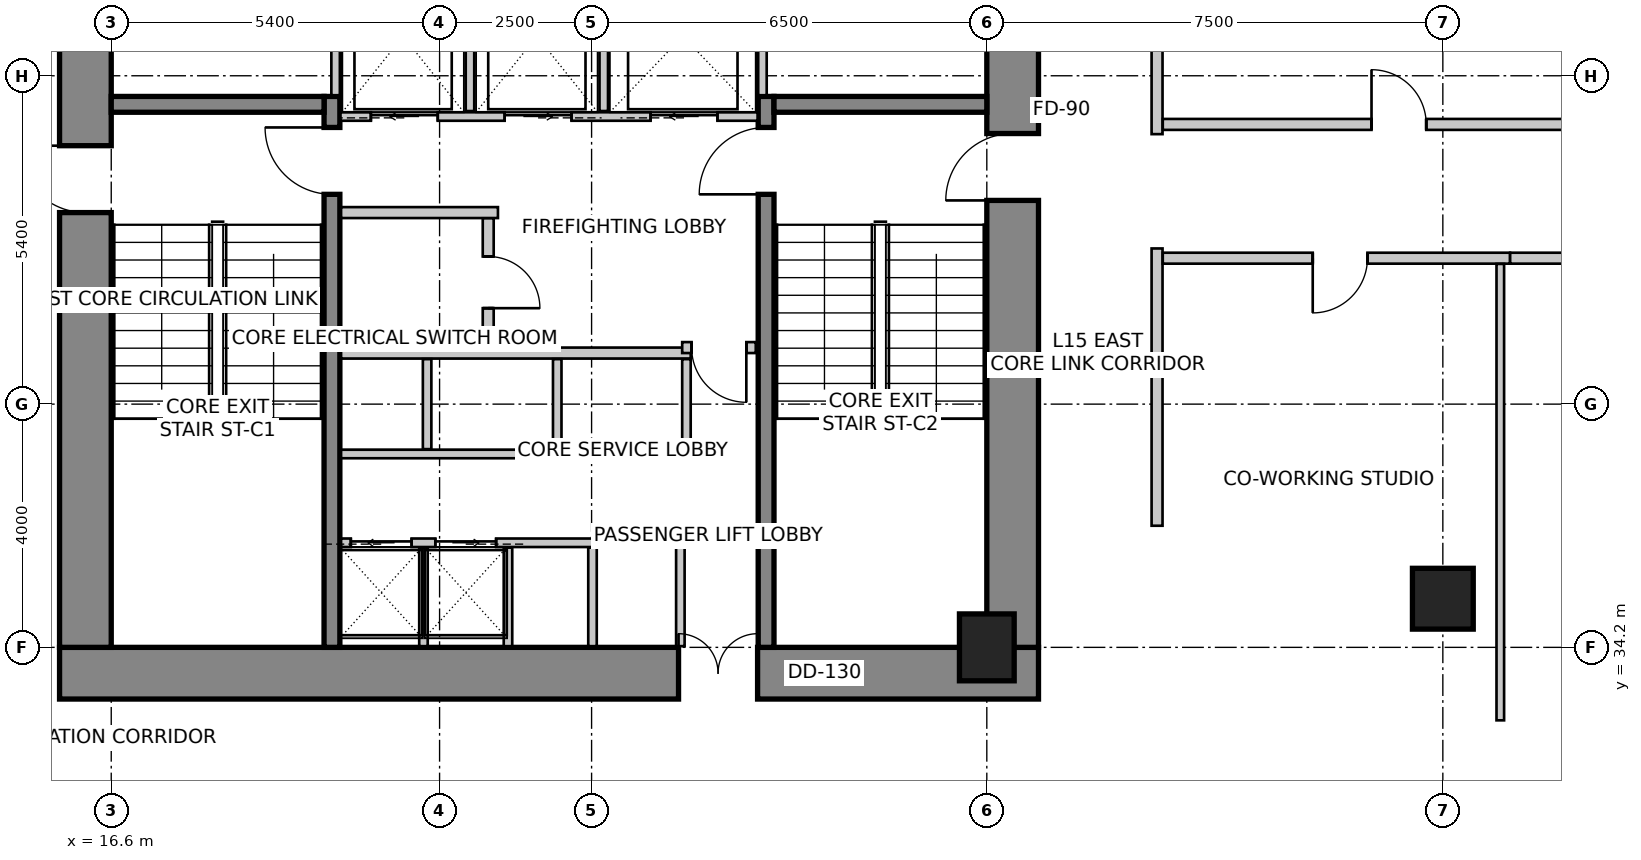
"""IFC4 building model, lengths in metres.
Left out: names, types, materials, properties, quantities, classifications, styles, units other than length and angle.
Written with IfcOpenShell. Run it as: python <this file> out.ifc"""

import sys

from ifc_helpers import new_model, si_unit, direction, frame, frame_2d, origin, origin_2d, place, context, subcontext, project, spatial, rectangle, extrude, source, transform, mapped, element, fill, save


model = new_model("IFC4")
c1 = context("Model", 3, precision=1e-05, world=origin(), true_north=direction((0.0, 1.0)))
c2 = subcontext(c1, "Body", "Model", "MODEL_VIEW")
j1 = project(units=[si_unit("LENGTHUNIT", "METRE"), si_unit("PLANEANGLEUNIT", "RADIAN")], contexts=[c1])
p1 = place(None, origin())
s1 = spatial("IfcSite", under=j1, at=p1, CompositionType="ELEMENT")
p2 = place(p1, origin())
s2 = spatial("IfcBuilding", under=s1, at=p2, CompositionType="ELEMENT")
p3 = place(p2, frame((0.0, 0.0, 63.0)))
s3 = spatial("IfcBuildingStorey", under=s2, at=p3, CompositionType="ELEMENT", Elevation=63.0)
p4 = place(p3, frame((15.75, 33.775, 0.0), z_axis=(0.0, 0.0, 1.0), x_axis=(1.0, 0.0, 0.0)))
e1 = element("IfcWall", 1, at=p4, inside=s3, PredefinedType="SHEAR", context=c2, shape_type="SweptSolid", body=[
    extrude(rectangle(XDim=16.1, YDim=0.85, at=frame_2d((8.05, 0.0))), origin(), (0.0, 0.0, 1.0), 4.0),
])
m1 = source(origin(), c2, "Body", "SweptSolid", [
    extrude(rectangle(XDim=1.3, YDim=2.15, at=frame_2d((0.65, 1.075))), frame((0.0, 0.435, 0.0), z_axis=(0.0, -1.0, 0.0), x_axis=(1.0, 0.0, 0.0)), (0.0, 0.0, 1.0), 0.87),
])
p5 = place(p4, frame((10.18, 0.0, 0.0)))
e2 = element("IfcOpeningElement", 2, at=p5, cuts=e1, PredefinedType="OPENING", context=c2, shape_type="MappedRepresentation", body=[
    mapped(m1, transform((0.0, 0.0, 0.0), scale=1.0)),
])
p6 = place(p3, frame((16.175, 34.2, 0.0), z_axis=(0.0, 0.0, 1.0), x_axis=(0.0, 1.0, 0.0)))
e3 = element("IfcWall", 3, at=p6, inside=s3, PredefinedType="SHEAR", context=c2, shape_type="SweptSolid", body=[
    extrude(rectangle(XDim=11.4, YDim=0.85, at=frame_2d((5.7, 0.0))), origin(), (0.0, 0.0, 1.0), 4.0),
])
m2 = source(origin(), c2, "Body", "SweptSolid", [
    extrude(rectangle(XDim=1.1, YDim=2.15, at=frame_2d((0.55, 1.075))), frame((0.0, 0.435, 0.0), z_axis=(0.0, -1.0, 0.0), x_axis=(1.0, 0.0, 0.0)), (0.0, 0.0, 1.0), 0.87),
])
p7 = place(p6, frame((7.15, 0.0, 0.0)))
e4 = element("IfcOpeningElement", 4, at=p7, cuts=e3, PredefinedType="OPENING", context=c2, shape_type="MappedRepresentation", body=[
    mapped(m2, transform((0.0, 0.0, 0.0), scale=1.0)),
])
p8 = place(p3, frame((31.425, 34.2, 0.0), z_axis=(0.0, 0.0, 1.0), x_axis=(0.0, 1.0, 0.0)))
e5 = element("IfcWall", 5, at=p8, inside=s3, PredefinedType="SHEAR", context=c2, shape_type="SweptSolid", body=[
    extrude(rectangle(XDim=11.4, YDim=0.85, at=frame_2d((5.7, 0.0))), origin(), (0.0, 0.0, 1.0), 4.0),
])
p9 = place(p8, frame((7.35, 0.0, 0.0)))
e6 = element("IfcOpeningElement", 6, at=p9, cuts=e5, PredefinedType="OPENING", context=c2, shape_type="MappedRepresentation", body=[
    mapped(m2, transform((0.0, 0.0, 0.0), scale=1.0)),
])
p10 = place(p3, frame((20.23, 34.2, 0.0), z_axis=(0.0, 0.0, 1.0), x_axis=(0.0, 1.0, 0.0)))
e7 = element("IfcWall", 7, at=p10, inside=s3, PredefinedType="SHEAR", context=c2, shape_type="SweptSolid", body=[
    extrude(rectangle(XDim=9.06, YDim=0.26, at=frame_2d((4.53, 0.0))), origin(), (0.0, 0.0, 1.0), 4.0),
])
m3 = source(origin(), c2, "Body", "SweptSolid", [
    extrude(rectangle(XDim=1.1, YDim=2.15, at=frame_2d((0.55, 1.075))), frame((0.0, 0.14, 0.0), z_axis=(0.0, -1.0, 0.0), x_axis=(1.0, 0.0, 0.0)), (0.0, 0.0, 1.0), 0.28),
])
p11 = place(p10, frame((7.45, 0.0, 0.0)))
e8 = element("IfcOpeningElement", 8, at=p11, cuts=e7, PredefinedType="OPENING", context=c2, shape_type="MappedRepresentation", body=[
    mapped(m3, transform((0.0, 0.0, 0.0), scale=1.0)),
])
p12 = place(p3, frame((27.37, 34.2, 0.0), z_axis=(0.0, 0.0, 1.0), x_axis=(0.0, 1.0, 0.0)))
e9 = element("IfcWall", 9, at=p12, inside=s3, PredefinedType="SHEAR", context=c2, shape_type="SweptSolid", body=[
    extrude(rectangle(XDim=9.06, YDim=0.26, at=frame_2d((4.53, 0.0))), origin(), (0.0, 0.0, 1.0), 4.0),
])
p13 = place(p12, frame((7.45, 0.0, 0.0)))
e10 = element("IfcOpeningElement", 10, at=p13, cuts=e9, PredefinedType="OPENING", context=c2, shape_type="MappedRepresentation", body=[
    mapped(m3, transform((0.0, 0.0, 0.0), scale=1.0)),
])
for number, where, z_axis, x_axis in (
    (11, (16.6, 43.13, 0.0), (0.0, 0.0, 1.0), (1.0, 0.0, 0.0)),
    (12, (27.5, 43.13, 0.0), (0.0, 0.0, 1.0), (1.0, 0.0, 0.0)),
):
    element("IfcWall", number, at=place(p3, frame(where, z_axis=z_axis, x_axis=x_axis)), inside=s3, PredefinedType="SHEAR", context=c2, shape_type="SweptSolid", body=[
        extrude(rectangle(XDim=3.5, YDim=0.26, at=frame_2d((1.75, 0.0))), origin(), (0.0, 0.0, 1.0), 4.0),
    ])
m4 = source(origin(), c2, "Body", "SweptSolid", [
    extrude(rectangle(XDim=0.9, YDim=1.1, at=origin_2d()), origin(), (0.0, 0.0, 1.0), 4.0),
])
p14 = place(p3, frame((31.0, 34.2, 0.0), z_axis=(0.0, 0.0, 1.0), x_axis=(1.0, 0.0, 0.0)))
e13 = element("IfcColumn", 13, at=p14, inside=s3, PredefinedType="COLUMN", context=c2, shape_type="MappedRepresentation", body=[
    mapped(m4, transform((0.0, 0.0, 0.0), scale=1.0)),
])
m5 = source(origin(), c2, "Body", "SweptSolid", [
    extrude(rectangle(XDim=1.0, YDim=1.0, at=origin_2d()), origin(), (0.0, 0.0, 1.0), 4.0),
])
p15 = place(p3, frame((38.5, 35.0, 0.0), z_axis=(0.0, 0.0, 1.0), x_axis=(1.0, 0.0, 0.0)))
e14 = element("IfcColumn", 14, at=p15, inside=s3, PredefinedType="COLUMN", context=c2, shape_type="MappedRepresentation", body=[
    mapped(m5, transform((0.0, 0.0, 0.0), scale=1.0)),
])
p16 = place(p3, frame((20.37, 42.93, 0.0), z_axis=(0.0, 0.0, 1.0), x_axis=(1.0, 0.0, 0.0)))
e15 = element("IfcWall", 15, at=p16, inside=s3, PredefinedType="SOLIDWALL", context=c2, shape_type="SweptSolid", body=[
    extrude(rectangle(XDim=6.86, YDim=0.14, at=frame_2d((3.43, 0.0))), origin(), (0.0, 0.0, 1.0), 3.75),
])
m6 = source(origin(), c2, "Body", "SweptSolid", [
    extrude(rectangle(XDim=1.1, YDim=2.15, at=frame_2d((0.55, 1.075))), frame((0.0, 0.08, 0.0), z_axis=(0.0, -1.0, 0.0), x_axis=(1.0, 0.0, 0.0)), (0.0, 0.0, 1.0), 0.16),
])
p17 = place(p16, frame((0.5, 0.0, 0.0)))
e16 = element("IfcOpeningElement", 16, at=p17, cuts=e15, PredefinedType="OPENING", context=c2, shape_type="MappedRepresentation", body=[
    mapped(m6, transform((0.0, 0.0, 0.0), scale=1.0)),
])
p18 = place(p16, frame((2.7, 0.0, 0.0)))
e17 = element("IfcOpeningElement", 17, at=p18, cuts=e15, PredefinedType="OPENING", context=c2, shape_type="MappedRepresentation", body=[
    mapped(m6, transform((0.0, 0.0, 0.0), scale=1.0)),
])
p19 = place(p16, frame((5.1, 0.0, 0.0)))
e18 = element("IfcOpeningElement", 18, at=p19, cuts=e15, PredefinedType="OPENING", context=c2, shape_type="MappedRepresentation", body=[
    mapped(m6, transform((0.0, 0.0, 0.0), scale=1.0)),
])
for number, where, z_axis, x_axis in (
    (19, (20.29, 43.28, 0.0), (0.0, 0.0, 1.0), (0.0, 1.0, 0.0)),
    (20, (27.31, 43.28, 0.0), (0.0, 0.0, 1.0), (0.0, 1.0, 0.0)),
):
    element("IfcWall", number, at=place(p3, frame(where, z_axis=z_axis, x_axis=x_axis)), inside=s3, PredefinedType="SOLIDWALL", context=c2, shape_type="SweptSolid", body=[
        extrude(rectangle(XDim=2.3, YDim=0.14, at=frame_2d((1.15, 0.0))), origin(), (0.0, 0.0, 1.0), 3.75),
    ])
for number, where, z_axis, x_axis in (
    (21, (22.5, 43.02, 0.0), (0.0, 0.0, 1.0), (0.0, 1.0, 0.0)),
    (22, (24.7, 43.02, 0.0), (0.0, 0.0, 1.0), (0.0, 1.0, 0.0)),
):
    element("IfcWall", number, at=place(p3, frame(where, z_axis=z_axis, x_axis=x_axis)), inside=s3, PredefinedType="SOLIDWALL", context=c2, shape_type="SweptSolid", body=[
        extrude(rectangle(XDim=2.56, YDim=0.14, at=frame_2d((1.28, 0.0))), origin(), (0.0, 0.0, 1.0), 3.75),
    ])
p20 = place(p3, frame((20.38, 35.92, 0.0), z_axis=(0.0, 0.0, 1.0), x_axis=(1.0, 0.0, 0.0)))
e23 = element("IfcWall", 23, at=p20, inside=s3, PredefinedType="SOLIDWALL", context=c2, shape_type="SweptSolid", body=[
    extrude(rectangle(XDim=5.65, YDim=0.14, at=frame_2d((2.825, 0.0))), origin(), (0.0, 0.0, 1.0), 3.75),
])
m7 = source(origin(), c2, "Body", "SweptSolid", [
    extrude(rectangle(XDim=1.0, YDim=2.15, at=frame_2d((0.5, 1.075))), frame((0.0, 0.08, 0.0), z_axis=(0.0, -1.0, 0.0), x_axis=(1.0, 0.0, 0.0)), (0.0, 0.0, 1.0), 0.16),
])
p21 = place(p20, frame((0.16, 0.0, 0.0)))
e24 = element("IfcOpeningElement", 24, at=p21, cuts=e23, PredefinedType="OPENING", context=c2, shape_type="MappedRepresentation", body=[
    mapped(m7, transform((0.0, 0.0, 0.0), scale=1.0)),
])
p22 = place(p20, frame((1.55, 0.0, 0.0)))
e25 = element("IfcOpeningElement", 25, at=p22, cuts=e23, PredefinedType="OPENING", context=c2, shape_type="MappedRepresentation", body=[
    mapped(m7, transform((0.0, 0.0, 0.0), scale=1.0)),
])
for number, where, z_axis, x_axis in (
    (26, (25.96, 34.22, 0.0), (0.0, 0.0, 1.0), (0.0, 1.0, 0.0)),
    (27, (21.735, 34.22, 0.0), (0.0, 0.0, 1.0), (0.0, 1.0, 0.0)),
    (28, (23.125, 34.22, 0.0), (0.0, 0.0, 1.0), (0.0, 1.0, 0.0)),
    (29, (24.515, 34.22, 0.0), (0.0, 0.0, 1.0), (0.0, 1.0, 0.0)),
):
    element("IfcWall", number, at=place(p3, frame(where, z_axis=z_axis, x_axis=x_axis)), inside=s3, PredefinedType="SOLIDWALL", context=c2, shape_type="SweptSolid", body=[
        extrude(rectangle(XDim=1.62, YDim=0.14, at=frame_2d((0.81, 0.0))), origin(), (0.0, 0.0, 1.0), 3.042),
    ])
p23 = place(p3, frame((20.38, 37.38, 0.0), z_axis=(0.0, 0.0, 1.0), x_axis=(1.0, 0.0, 0.0)))
e30 = element("IfcWall", 30, at=p23, inside=s3, PredefinedType="SOLIDWALL", context=c2, shape_type="SweptSolid", body=[
    extrude(rectangle(XDim=5.75, YDim=0.14, at=frame_2d((2.875, 0.0))), origin(), (0.0, 0.0, 1.0), 3.75),
])
p24 = place(p3, frame((20.38, 39.04, 0.0), z_axis=(0.0, 0.0, 1.0), x_axis=(1.0, 0.0, 0.0)))
e31 = element("IfcWall", 31, at=p24, inside=s3, PredefinedType="SOLIDWALL", context=c2, shape_type="SweptSolid", body=[
    extrude(rectangle(XDim=5.75, YDim=0.18, at=frame_2d((2.875, 0.0))), origin(), (0.0, 0.0, 1.0), 3.75),
])
for number, where, z_axis, x_axis in (
    (32, (26.06, 37.46, 0.0), (0.0, 0.0, 1.0), (0.0, 1.0, 0.0)),
    (33, (21.795, 37.46, 0.0), (0.0, 0.0, 1.0), (0.0, 1.0, 0.0)),
    (34, (23.935, 37.46, 0.0), (0.0, 0.0, 1.0), (0.0, 1.0, 0.0)),
):
    element("IfcWall", number, at=place(p3, frame(where, z_axis=z_axis, x_axis=x_axis)), inside=s3, PredefinedType="SOLIDWALL", context=c2, shape_type="SweptSolid", body=[
        extrude(rectangle(XDim=1.48, YDim=0.14, at=frame_2d((0.74, 0.0))), origin(), (0.0, 0.0, 1.0), 3.75),
    ])
p25 = place(p3, frame((22.96, 41.35, 0.0), z_axis=(0.0, 0.0, 1.0), x_axis=(-1.0, 0.0, 0.0)))
e35 = element("IfcWall", 35, at=p25, inside=s3, PredefinedType="PARTITIONING", context=c2, shape_type="SweptSolid", body=[
    extrude(rectangle(XDim=2.58, YDim=0.18, at=frame_2d((1.29, 0.0))), origin(), (0.0, 0.0, 1.0), 3.75),
])
p26 = place(p3, frame((22.8, 41.256, 0.0), z_axis=(0.0, 0.0, 1.0), x_axis=(0.0, -1.0, 0.0)))
e36 = element("IfcWall", 36, at=p26, inside=s3, PredefinedType="PARTITIONING", context=c2, shape_type="SweptSolid", body=[
    extrude(rectangle(XDim=2.106, YDim=0.18, at=frame_2d((1.053, 0.0))), origin(), (0.0, 0.0, 1.0), 3.75),
])
m8 = source(origin(), c2, "Body", "SweptSolid", [
    extrude(rectangle(XDim=0.85, YDim=2.15, at=frame_2d((0.425, 1.075))), frame((0.0, 0.1, 0.0), z_axis=(0.0, -1.0, 0.0), x_axis=(1.0, 0.0, 0.0)), (0.0, 0.0, 1.0), 0.2),
])
p27 = place(p26, frame((0.628, 0.0, 0.0)))
e37 = element("IfcOpeningElement", 37, at=p27, cuts=e36, PredefinedType="OPENING", context=c2, shape_type="MappedRepresentation", body=[
    mapped(m8, transform((0.0, 0.0, 0.0), scale=1.0)),
])
p28 = place(p3, frame((27.2, 39.13, 0.0), z_axis=(0.0, 0.0, 1.0), x_axis=(-1.0, 0.0, 0.0)))
e38 = element("IfcWall", 38, at=p28, inside=s3, PredefinedType="PARTITIONING", context=c2, shape_type="SweptSolid", body=[
    extrude(rectangle(XDim=1.21, YDim=0.18, at=frame_2d((0.605, 0.0))), origin(), (0.0, 0.0, 1.0), 3.75),
])
m9 = source(origin(), c2, "Body", "SweptSolid", [
    extrude(rectangle(XDim=0.9, YDim=2.15, at=frame_2d((0.45, 1.075))), frame((0.0, 0.1, 0.0), z_axis=(0.0, -1.0, 0.0), x_axis=(1.0, 0.0, 0.0)), (0.0, 0.0, 1.0), 0.2),
])
p29 = place(p28, frame((0.155, 0.0, 0.0)))
e39 = element("IfcOpeningElement", 39, at=p29, cuts=e38, PredefinedType="OPENING", context=c2, shape_type="MappedRepresentation", body=[
    mapped(m9, transform((0.0, 0.0, 0.0), scale=1.0)),
])
p30 = place(p3, frame((33.8, 40.76, 0.0), z_axis=(0.0, 0.0, 1.0), x_axis=(0.0, -1.0, 0.0)))
e40 = element("IfcWall", 40, at=p30, inside=s3, PredefinedType="PARTITIONING", context=c2, shape_type="SweptSolid", body=[
    extrude(rectangle(XDim=4.56, YDim=0.18, at=frame_2d((2.28, 0.0))), origin(), (0.0, 0.0, 1.0), 3.75),
])
p31 = place(p3, frame((33.8, 46.356, 0.0), z_axis=(0.0, 0.0, 1.0), x_axis=(0.0, -1.0, 0.0)))
e41 = element("IfcWall", 41, at=p31, inside=s3, PredefinedType="PARTITIONING", context=c2, shape_type="SweptSolid", body=[
    extrude(rectangle(XDim=3.716, YDim=0.18, at=frame_2d((1.858, 0.0))), origin(), (0.0, 0.0, 1.0), 3.188),
])
p32 = place(p3, frame((39.605, 40.6, 0.0), z_axis=(0.0, 0.0, 1.0), x_axis=(-1.0, 0.0, 0.0)))
e42 = element("IfcWall", 42, at=p32, inside=s3, PredefinedType="PARTITIONING", context=c2, shape_type="SweptSolid", body=[
    extrude(rectangle(XDim=5.711, YDim=0.18, at=frame_2d((2.855, 0.0))), origin(), (0.0, 0.0, 1.0), 3.125),
])
p33 = place(p32, frame((2.345, 0.0, 0.0)))
e43 = element("IfcOpeningElement", 43, at=p33, cuts=e42, PredefinedType="OPENING", context=c2, shape_type="MappedRepresentation", body=[
    mapped(m9, transform((0.0, 0.0, 0.0), scale=1.0)),
])
p34 = place(p3, frame((45.25, 40.6, 0.0), z_axis=(0.0, 0.0, 1.0), x_axis=(-1.0, 0.0, 0.0)))
e44 = element("IfcWall", 44, at=p34, inside=s3, PredefinedType="PARTITIONING", context=c2, shape_type="SweptSolid", body=[
    extrude(rectangle(XDim=5.643, YDim=0.18, at=frame_2d((2.822, 0.0))), origin(), (0.0, 0.0, 1.0), 3.188),
])
p35 = place(p34, frame((2.372, 0.0, 0.0)))
e45 = element("IfcOpeningElement", 45, at=p35, cuts=e44, PredefinedType="OPENING", context=c2, shape_type="MappedRepresentation", body=[
    mapped(m9, transform((0.0, 0.0, 0.0), scale=1.0)),
])
p36 = place(p3, frame((33.894, 42.8, 0.0), z_axis=(0.0, 0.0, 1.0), x_axis=(1.0, 0.0, 0.0)))
e46 = element("IfcWall", 46, at=p36, inside=s3, PredefinedType="PARTITIONING", context=c2, shape_type="SweptSolid", body=[
    extrude(rectangle(XDim=7.766, YDim=0.18, at=frame_2d((3.883, 0.0))), origin(), (0.0, 0.0, 1.0), 3.125),
])
p37 = place(p36, frame((3.433, 0.0, 0.0)))
e47 = element("IfcOpeningElement", 47, at=p37, cuts=e46, PredefinedType="OPENING", context=c2, shape_type="MappedRepresentation", body=[
    mapped(m9, transform((0.0, 0.0, 0.0), scale=1.0)),
])
p38 = place(p3, frame((39.445, 40.506, 0.0), z_axis=(0.0, 0.0, 1.0), x_axis=(0.0, -1.0, 0.0)))
e48 = element("IfcWall", 48, at=p38, inside=s3, PredefinedType="PARTITIONING", context=c2, shape_type="SweptSolid", body=[
    extrude(rectangle(XDim=7.506, YDim=0.125, at=frame_2d((3.753, 0.0))), origin(), (0.0, 0.0, 1.0), 2.892),
])
m10 = source(origin(), c2, "Body", "SweptSolid", [
    extrude(rectangle(XDim=1.1, YDim=2.15, at=frame_2d((0.55, 1.075))), frame((0.0, 0.025, 0.0), z_axis=(0.0, -1.0, 0.0), x_axis=(1.0, 0.0, 0.0)), (0.0, 0.0, 1.0), 0.05),
])
p39 = place(p17, origin())
e49 = element("IfcDoor", 49, at=p39, inside=s3, OperationType="SLIDING_TO_LEFT", PredefinedType="DOOR", context=c2, shape_type="MappedRepresentation", body=[
    mapped(m10, transform((0.0, 0.0, 0.0), scale=1.0)),
])
fill(e16, e49)
p40 = place(p18, origin())
e50 = element("IfcDoor", 50, at=p40, inside=s3, OperationType="SLIDING_TO_RIGHT", PredefinedType="DOOR", context=c2, shape_type="MappedRepresentation", body=[
    mapped(m10, transform((0.0, 0.0, 0.0), scale=1.0)),
])
fill(e17, e50)
m11 = source(origin(), c2, "Body", "SweptSolid", [
    extrude(rectangle(XDim=1.1, YDim=2.15, at=frame_2d((0.55, 1.075))), frame((0.0, 0.025, 0.0), z_axis=(0.0, -1.0, 0.0), x_axis=(1.0, 0.0, 0.0)), (0.0, 0.0, 1.0), 0.05),
])
p41 = place(p19, origin())
e51 = element("IfcDoor", 51, at=p41, inside=s3, OperationType="SLIDING_TO_LEFT", PredefinedType="DOOR", context=c2, shape_type="MappedRepresentation", body=[
    mapped(m11, transform((0.0, 0.0, 0.0), scale=1.0)),
])
fill(e18, e51)
m12 = source(origin(), c2, "Body", "SweptSolid", [
    extrude(rectangle(XDim=1.0, YDim=2.15, at=frame_2d((0.5, 1.075))), frame((0.0, 0.025, 0.0), z_axis=(0.0, -1.0, 0.0), x_axis=(1.0, 0.0, 0.0)), (0.0, 0.0, 1.0), 0.05),
])
p42 = place(p21, origin())
e52 = element("IfcDoor", 52, at=p42, inside=s3, OperationType="SLIDING_TO_LEFT", PredefinedType="DOOR", context=c2, shape_type="MappedRepresentation", body=[
    mapped(m12, transform((0.0, 0.0, 0.0), scale=1.0)),
])
fill(e24, e52)
p43 = place(p22, origin())
e53 = element("IfcDoor", 53, at=p43, inside=s3, OperationType="SLIDING_TO_RIGHT", PredefinedType="DOOR", context=c2, shape_type="MappedRepresentation", body=[
    mapped(m12, transform((0.0, 0.0, 0.0), scale=1.0)),
])
fill(e25, e53)
m13 = source(origin(), c2, "Body", "SweptSolid", [
    extrude(rectangle(XDim=1.1, YDim=2.15, at=frame_2d((0.55, 1.075))), frame((0.0, 0.025, 0.0), z_axis=(0.0, -1.0, 0.0), x_axis=(1.0, 0.0, 0.0)), (0.0, 0.0, 1.0), 0.05),
])
p44 = place(p11, origin())
e54 = element("IfcDoor", 54, at=p44, inside=s3, OperationType="SINGLE_SWING_RIGHT", PredefinedType="DOOR", context=c2, shape_type="MappedRepresentation", body=[
    mapped(m13, transform((0.0, 0.0, 0.0), scale=1.0)),
])
fill(e8, e54)
p45 = place(p13, origin())
e55 = element("IfcDoor", 55, at=p45, inside=s3, OperationType="SINGLE_SWING_LEFT", PredefinedType="DOOR", context=c2, shape_type="MappedRepresentation", body=[
    mapped(m13, transform((0.0, 0.0, 0.0), scale=1.0)),
])
fill(e10, e55)
p46 = place(p7, origin())
e56 = element("IfcDoor", 56, at=p46, inside=s3, OperationType="SINGLE_SWING_RIGHT", PredefinedType="DOOR", context=c2, shape_type="MappedRepresentation", body=[
    mapped(m13, transform((0.0, 0.0, 0.0), scale=1.0)),
])
fill(e4, e56)
p47 = place(p9, origin())
e57 = element("IfcDoor", 57, at=p47, inside=s3, OperationType="SINGLE_SWING_LEFT", PredefinedType="DOOR", context=c2, shape_type="MappedRepresentation", body=[
    mapped(m13, transform((0.0, 0.0, 0.0), scale=1.0)),
])
fill(e6, e57)
m14 = source(origin(), c2, "Body", "SweptSolid", [
    extrude(rectangle(XDim=1.3, YDim=2.15, at=frame_2d((0.65, 1.075))), frame((0.0, 0.025, 0.0), z_axis=(0.0, -1.0, 0.0), x_axis=(1.0, 0.0, 0.0)), (0.0, 0.0, 1.0), 0.05),
])
p48 = place(p5, origin())
e58 = element("IfcDoor", 58, at=p48, inside=s3, OperationType="DOUBLE_DOOR_SINGLE_SWING", PredefinedType="DOOR", context=c2, shape_type="MappedRepresentation", body=[
    mapped(m14, transform((0.0, 0.0, 0.0), scale=1.0)),
])
fill(e2, e58)
m15 = source(origin(), c2, "Body", "SweptSolid", [
    extrude(rectangle(XDim=0.85, YDim=2.15, at=frame_2d((0.425, 1.075))), frame((0.0, 0.025, 0.0), z_axis=(0.0, -1.0, 0.0), x_axis=(1.0, 0.0, 0.0)), (0.0, 0.0, 1.0), 0.05),
])
p49 = place(p27, origin())
e59 = element("IfcDoor", 59, at=p49, inside=s3, OperationType="SINGLE_SWING_RIGHT", PredefinedType="DOOR", context=c2, shape_type="MappedRepresentation", body=[
    mapped(m15, transform((0.0, 0.0, 0.0), scale=1.0)),
])
fill(e37, e59)
m16 = source(origin(), c2, "Body", "SweptSolid", [
    extrude(rectangle(XDim=0.9, YDim=2.15, at=frame_2d((0.45, 1.075))), frame((0.0, 0.025, 0.0), z_axis=(0.0, -1.0, 0.0), x_axis=(1.0, 0.0, 0.0)), (0.0, 0.0, 1.0), 0.05),
])
p50 = place(p29, origin())
e60 = element("IfcDoor", 60, at=p50, inside=s3, OperationType="SINGLE_SWING_LEFT", PredefinedType="DOOR", context=c2, shape_type="MappedRepresentation", body=[
    mapped(m16, transform((0.0, 0.0, 0.0), scale=1.0)),
])
fill(e39, e60)
m17 = source(origin(), c2, "Body", "SweptSolid", [
    extrude(rectangle(XDim=0.9, YDim=2.15, at=frame_2d((0.45, 1.075))), frame((0.0, 0.025, 0.0), z_axis=(0.0, -1.0, 0.0), x_axis=(1.0, 0.0, 0.0)), (0.0, 0.0, 1.0), 0.05),
])
p51 = place(p33, origin())
e61 = element("IfcDoor", 61, at=p51, inside=s3, OperationType="SINGLE_SWING_RIGHT", PredefinedType="DOOR", context=c2, shape_type="MappedRepresentation", body=[
    mapped(m17, transform((0.0, 0.0, 0.0), scale=1.0)),
])
fill(e43, e61)
p52 = place(p37, origin())
e62 = element("IfcDoor", 62, at=p52, inside=s3, OperationType="SINGLE_SWING_LEFT", PredefinedType="DOOR", context=c2, shape_type="MappedRepresentation", body=[
    mapped(m17, transform((0.0, 0.0, 0.0), scale=1.0)),
])
fill(e47, e62)
save(model, sys.argv[1])
